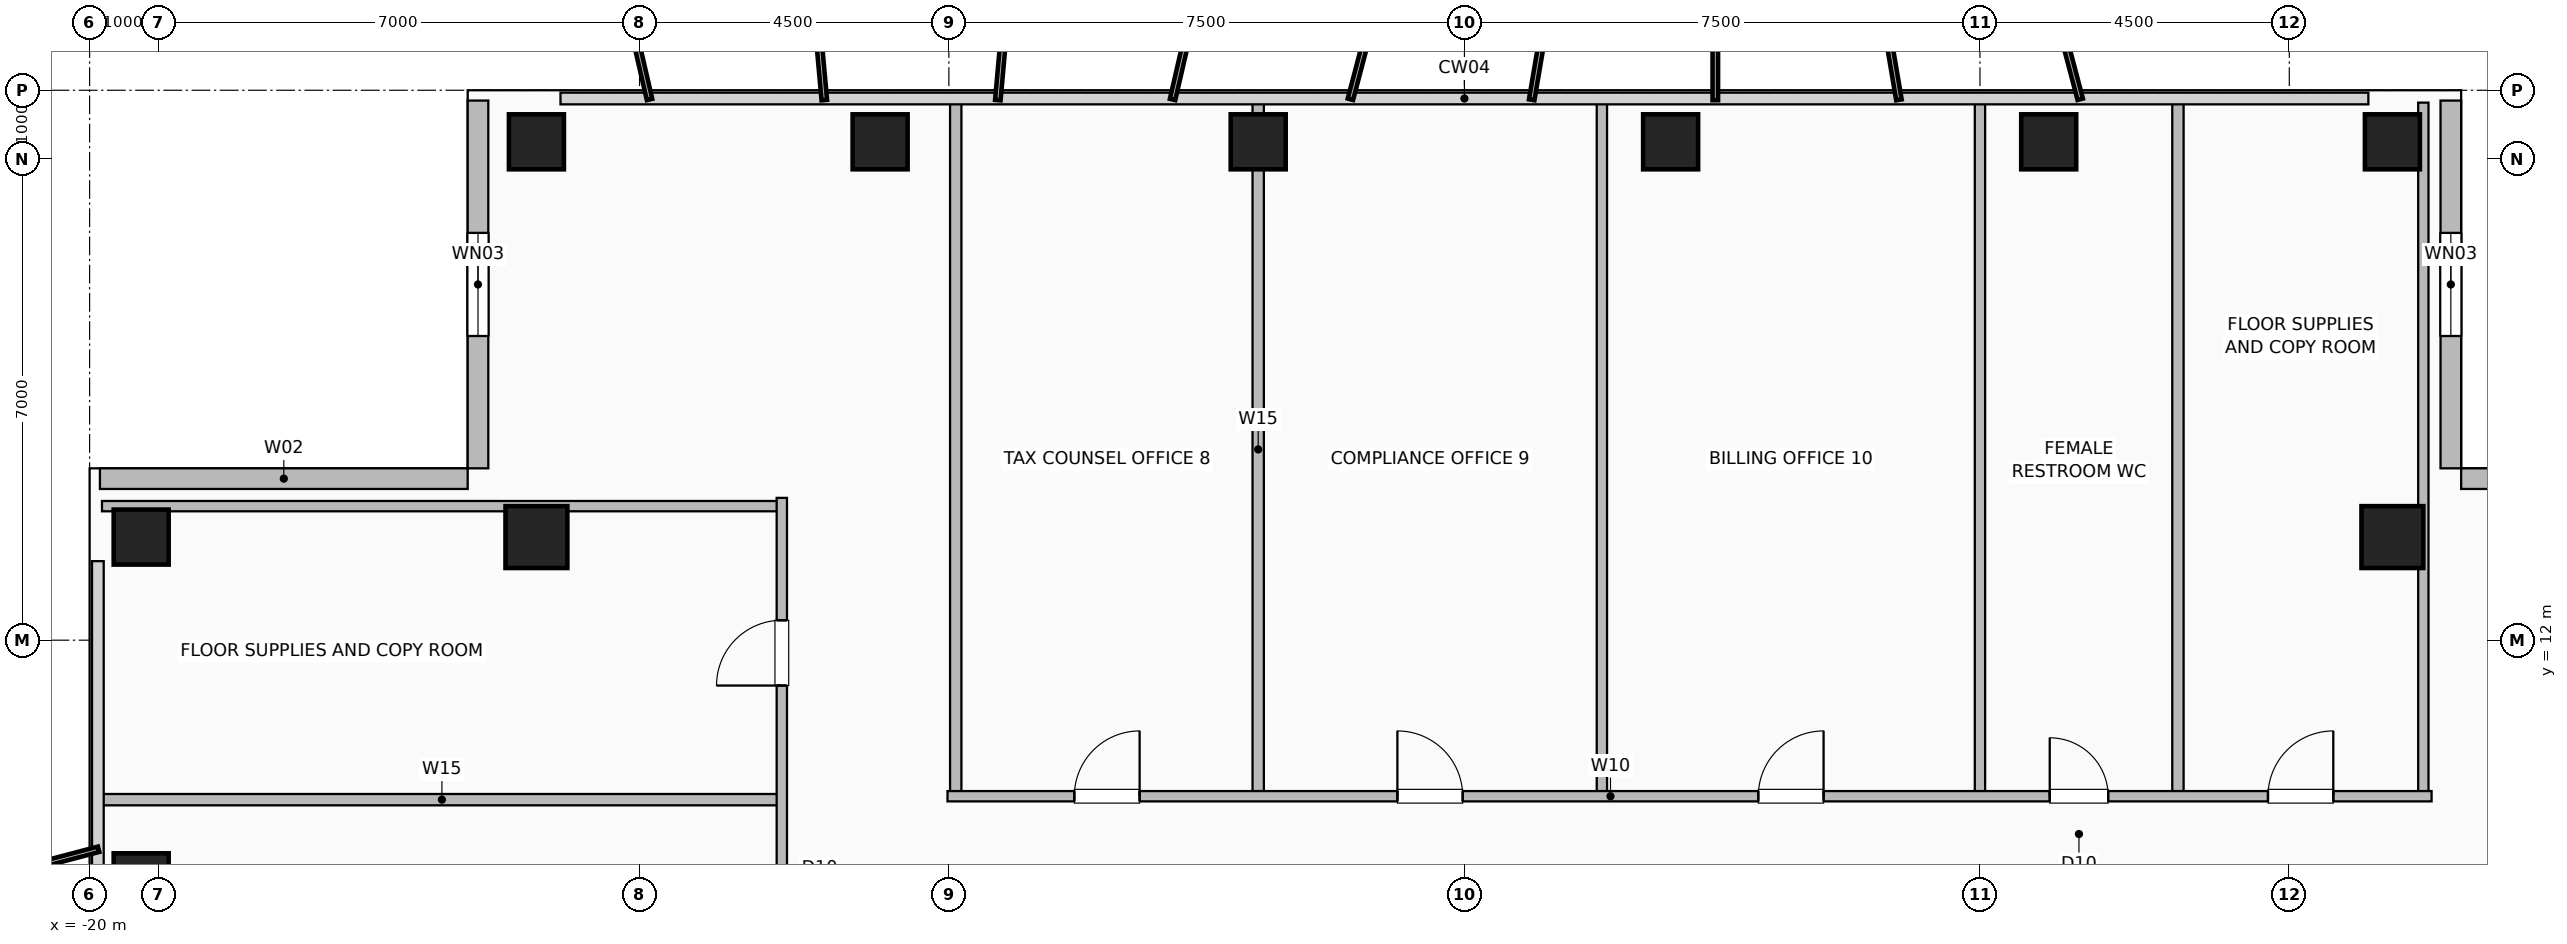
"""IFC4 building model, lengths in metres.
Left out: names, types, materials, properties, quantities, classifications, styles, units other than length and angle.
Written with IfcOpenShell. Run it as: python <this file> out.ifc"""

import sys

from ifc_helpers import new_model, si_unit, direction, frame, frame_2d, origin, origin_2d, place, context, subcontext, project, spatial, rectangle, hollow_rectangle, extrude, element, fill, save


model = new_model("IFC4")
c1 = context("Model", 3, precision=1e-05, world=origin(), true_north=direction((0.0, 1.0)))
c2 = subcontext(c1, "Body", "Model", "MODEL_VIEW")
j1 = project(units=[si_unit("LENGTHUNIT", "METRE"), si_unit("PLANEANGLEUNIT", "RADIAN")], contexts=[c1])
p1 = place(None, origin())
s1 = spatial("IfcSite", under=j1, at=p1, CompositionType="ELEMENT")
p2 = place(p1, origin())
s2 = spatial("IfcBuilding", under=s1, at=p2, CompositionType="ELEMENT")
p3 = place(p2, frame((0.0, 0.0, 173.4)))
s3 = spatial("IfcBuildingStorey", under=s2, at=p3, CompositionType="ELEMENT", Elevation=173.4)
for number, where, z_axis, x_axis in (
    (1, (-13.5, 19.25, 0.0), (0.0, 0.0, 1.0), (1.0, 0.0, 0.0)),
    (2, (-8.5, 19.25, 0.0), (0.0, 0.0, 1.0), (1.0, 0.0, 0.0)),
    (3, (-3.0, 19.25, 0.0), (0.0, 0.0, 1.0), (1.0, 0.0, 0.0)),
    (4, (3.0, 19.25, 0.0), (0.0, 0.0, 1.0), (1.0, 0.0, 0.0)),
    (5, (8.5, 19.25, 0.0), (0.0, 0.0, 1.0), (1.0, 0.0, 0.0)),
    (6, (-19.25, 8.5, 0.0), (0.0, 0.0, 1.0), (1.0, 0.0, 0.0)),
    (7, (13.5, 19.25, 0.0), (0.0, 0.0, 1.0), (1.0, 0.0, 0.0)),
    (8, (-19.25, 13.5, 0.0), (0.0, 0.0, 1.0), (1.0, 0.0, 0.0)),
):
    element("IfcColumn", number, at=place(p3, frame(where, z_axis=z_axis, x_axis=x_axis)), inside=s3, PredefinedType="COLUMN", context=c2, shape_type="SweptSolid", body=[
        extrude(hollow_rectangle(XDim=0.8, YDim=0.8, WallThickness=0.04, at=origin_2d()), origin(), (0.0, 0.0, 1.0), 3.6),
    ])
for number, where, z_axis, x_axis in (
    (9, (13.5, 13.5, 0.0), (0.0, 0.0, 1.0), (1.0, 0.0, 0.0)),
    (10, (-13.5, 13.5, 0.0), (0.0, 0.0, 1.0), (1.0, 0.0, 0.0)),
):
    element("IfcColumn", number, at=place(p3, frame(where, z_axis=z_axis, x_axis=x_axis)), inside=s3, PredefinedType="COLUMN", context=c2, shape_type="SweptSolid", body=[
        extrude(hollow_rectangle(XDim=0.9, YDim=0.9, WallThickness=0.045, at=origin_2d()), origin(), (0.0, 0.0, 1.0), 3.6),
    ])
p4 = place(p3, frame((14.35, 19.85, 0.0), z_axis=(0.0, 0.0, 1.0), x_axis=(0.0, -1.0, 0.0)))
e11 = element("IfcWall", 11, at=p4, inside=s3, PredefinedType="SOLIDWALL", context=c2, shape_type="SweptSolid", body=[
    extrude(rectangle(XDim=5.35, YDim=0.3, at=frame_2d((2.675, 0.0))), origin(), (0.0, 0.0, 1.0), 3.36),
])
p5 = place(p4, frame((1.925, 0.0, 0.9)))
e12 = element("IfcOpeningElement", 12, at=p5, cuts=e11, PredefinedType="OPENING", context=c2, shape_type="SweptSolid", body=[
    extrude(rectangle(XDim=1.5, YDim=1.8, at=frame_2d((0.75, 0.9))), frame((0.0, 0.16, 0.0), z_axis=(0.0, -1.0, 0.0), x_axis=(1.0, 0.0, 0.0)), (0.0, 0.0, 1.0), 0.32),
])
p6 = place(p3, frame((19.85, 14.35, 0.0), z_axis=(0.0, 0.0, 1.0), x_axis=(-1.0, 0.0, 0.0)))
e13 = element("IfcWall", 13, at=p6, inside=s3, PredefinedType="SOLIDWALL", context=c2, shape_type="SweptSolid", body=[
    extrude(rectangle(XDim=5.35, YDim=0.3, at=frame_2d((2.675, 0.0))), origin(), (0.0, 0.0, 1.0), 3.36),
])
p7 = place(p3, frame((-14.35, 19.85, 0.0), z_axis=(0.0, 0.0, 1.0), x_axis=(0.0, -1.0, 0.0)))
e14 = element("IfcWall", 14, at=p7, inside=s3, PredefinedType="SOLIDWALL", context=c2, shape_type="SweptSolid", body=[
    extrude(rectangle(XDim=5.35, YDim=0.3, at=frame_2d((2.675, 0.0))), origin(), (0.0, 0.0, 1.0), 3.36),
])
p8 = place(p7, frame((1.925, 0.0, 0.9)))
e15 = element("IfcOpeningElement", 15, at=p8, cuts=e14, PredefinedType="OPENING", context=c2, shape_type="SweptSolid", body=[
    extrude(rectangle(XDim=1.5, YDim=1.8, at=frame_2d((0.75, 0.9))), frame((0.0, 0.16, 0.0), z_axis=(0.0, -1.0, 0.0), x_axis=(1.0, 0.0, 0.0)), (0.0, 0.0, 1.0), 0.32),
])
p9 = place(p3, frame((-19.85, 14.35, 0.0), z_axis=(0.0, 0.0, 1.0), x_axis=(1.0, 0.0, 0.0)))
e16 = element("IfcWall", 16, at=p9, inside=s3, PredefinedType="SOLIDWALL", context=c2, shape_type="SweptSolid", body=[
    extrude(rectangle(XDim=5.35, YDim=0.3, at=frame_2d((2.675, 0.0))), origin(), (0.0, 0.0, 1.0), 3.36),
])
p10 = place(p3, frame((-19.82, 9.68, 0.0), z_axis=(0.0, 0.0, 1.0), x_axis=(1.0, 0.0, 0.0)))
e17 = element("IfcWall", 17, at=p10, inside=s3, PredefinedType="PLUMBINGWALL", context=c2, shape_type="SweptSolid", body=[
    extrude(rectangle(XDim=9.89, YDim=0.165, at=frame_2d((4.945, 0.0))), origin(), (0.0, 0.0, 1.0), 3.36),
])
p11 = place(p3, frame((-19.82, 13.95, 0.0), z_axis=(0.0, 0.0, 1.0), x_axis=(1.0, 0.0, 0.0)))
e18 = element("IfcWall", 18, at=p11, inside=s3, PredefinedType="PARTITIONING", context=c2, shape_type="SweptSolid", body=[
    extrude(rectangle(XDim=9.89, YDim=0.15, at=frame_2d((4.945, 0.0))), origin(), (0.0, 0.0, 1.0), 3.36),
])
p12 = place(p3, frame((-9.93, -7.52, 0.0), z_axis=(0.0, 0.0, 1.0), x_axis=(0.0, 1.0, 0.0)))
e19 = element("IfcWall", 19, at=p12, inside=s3, PredefinedType="PARTITIONING", context=c2, shape_type="SweptSolid", body=[
    extrude(rectangle(XDim=21.59, YDim=0.15, at=frame_2d((10.795, 0.0))), origin(), (0.0, 0.0, 1.0), 3.36),
])
p13 = place(p12, frame((1.745, 0.0, 0.0)))
e20 = element("IfcOpeningElement", 20, at=p13, cuts=e19, PredefinedType="OPENING", context=c2, shape_type="SweptSolid", body=[
    extrude(rectangle(XDim=0.95, YDim=2.06, at=frame_2d((0.475, 1.03))), frame((0.0, 0.085, 0.0), z_axis=(0.0, -1.0, 0.0), x_axis=(1.0, 0.0, 0.0)), (0.0, 0.0, 1.0), 0.17),
])
p14 = place(p12, frame((6.195, 0.0, 0.0)))
e21 = element("IfcOpeningElement", 21, at=p14, cuts=e19, PredefinedType="OPENING", context=c2, shape_type="SweptSolid", body=[
    extrude(rectangle(XDim=0.95, YDim=2.06, at=frame_2d((0.475, 1.03))), frame((0.0, 0.085, 0.0), z_axis=(0.0, -1.0, 0.0), x_axis=(1.0, 0.0, 0.0)), (0.0, 0.0, 1.0), 0.17),
])
p15 = place(p12, frame((11.195, 0.0, 0.0)))
e22 = element("IfcOpeningElement", 22, at=p15, cuts=e19, PredefinedType="OPENING", context=c2, shape_type="SweptSolid", body=[
    extrude(rectangle(XDim=0.95, YDim=2.06, at=frame_2d((0.475, 1.03))), frame((0.0, 0.085, 0.0), z_axis=(0.0, -1.0, 0.0), x_axis=(1.0, 0.0, 0.0)), (0.0, 0.0, 1.0), 0.17),
])
p16 = place(p12, frame((15.335, 0.0, 0.0)))
e23 = element("IfcOpeningElement", 23, at=p16, cuts=e19, PredefinedType="OPENING", context=c2, shape_type="SweptSolid", body=[
    extrude(rectangle(XDim=0.85, YDim=2.05, at=frame_2d((0.425, 1.025))), frame((0.0, 0.085, 0.0), z_axis=(0.0, -1.0, 0.0), x_axis=(1.0, 0.0, 0.0)), (0.0, 0.0, 1.0), 0.17),
])
p17 = place(p12, frame((18.86, 0.0, 0.0)))
e24 = element("IfcOpeningElement", 24, at=p17, cuts=e19, PredefinedType="OPENING", context=c2, shape_type="SweptSolid", body=[
    extrude(rectangle(XDim=0.95, YDim=2.06, at=frame_2d((0.475, 1.03))), frame((0.0, 0.085, 0.0), z_axis=(0.0, -1.0, 0.0), x_axis=(1.0, 0.0, 0.0)), (0.0, 0.0, 1.0), 0.17),
])
for number, where, z_axis, x_axis in (
    (25, (10.38, 9.73, 0.0), (0.0, 0.0, 1.0), (0.0, 1.0, 0.0)),
    (26, (-7.4, 9.73, 0.0), (0.0, 0.0, 1.0), (0.0, 1.0, 0.0)),
):
    element("IfcWall", number, at=place(p3, frame(where, z_axis=z_axis, x_axis=x_axis)), inside=s3, PredefinedType="PLUMBINGWALL", context=c2, shape_type="SweptSolid", body=[
        extrude(rectangle(XDim=10.09, YDim=0.165, at=frame_2d((5.045, 0.0))), origin(), (0.0, 0.0, 1.0), 3.36),
    ])
p18 = place(p3, frame((-3.0, 9.73, 0.0), z_axis=(0.0, 0.0, 1.0), x_axis=(0.0, 1.0, 0.0)))
e27 = element("IfcWall", 27, at=p18, inside=s3, PredefinedType="PLUMBINGWALL", context=c2, shape_type="SweptSolid", body=[
    extrude(rectangle(XDim=10.09, YDim=0.165, at=frame_2d((5.045, 0.0))), origin(), (0.0, 0.0, 1.0), 2.792),
])
for number, where, z_axis, x_axis in (
    (28, (2.0, 9.73, 0.0), (0.0, 0.0, 1.0), (0.0, 1.0, 0.0)),
    (29, (7.5, 9.73, 0.0), (0.0, 0.0, 1.0), (0.0, 1.0, 0.0)),
    (30, (13.95, 9.73, 0.0), (0.0, 0.0, 1.0), (0.0, 1.0, 0.0)),
):
    element("IfcWall", number, at=place(p3, frame(where, z_axis=z_axis, x_axis=x_axis)), inside=s3, PredefinedType="PARTITIONING", context=c2, shape_type="SweptSolid", body=[
        extrude(rectangle(XDim=10.09, YDim=0.15, at=frame_2d((5.045, 0.0))), origin(), (0.0, 0.0, 1.0), 3.36),
    ])
p19 = place(p3, frame((-7.52, 9.73, 0.0), z_axis=(0.0, 0.0, 1.0), x_axis=(1.0, 0.0, 0.0)))
e31 = element("IfcWall", 31, at=p19, inside=s3, PredefinedType="PARTITIONING", context=c2, shape_type="SweptSolid", body=[
    extrude(rectangle(XDim=21.59, YDim=0.15, at=frame_2d((10.795, 0.0))), origin(), (0.0, 0.0, 1.0), 3.36),
])
p20 = place(p19, frame((1.845, 0.0, 0.0)))
e32 = element("IfcOpeningElement", 32, at=p20, cuts=e31, PredefinedType="OPENING", context=c2, shape_type="SweptSolid", body=[
    extrude(rectangle(XDim=0.95, YDim=2.06, at=frame_2d((0.475, 1.03))), frame((0.0, 0.085, 0.0), z_axis=(0.0, -1.0, 0.0), x_axis=(1.0, 0.0, 0.0)), (0.0, 0.0, 1.0), 0.17),
])
p21 = place(p19, frame((6.545, 0.0, 0.0)))
e33 = element("IfcOpeningElement", 33, at=p21, cuts=e31, PredefinedType="OPENING", context=c2, shape_type="SweptSolid", body=[
    extrude(rectangle(XDim=0.95, YDim=2.06, at=frame_2d((0.475, 1.03))), frame((0.0, 0.085, 0.0), z_axis=(0.0, -1.0, 0.0), x_axis=(1.0, 0.0, 0.0)), (0.0, 0.0, 1.0), 0.17),
])
p22 = place(p19, frame((11.795, 0.0, 0.0)))
e34 = element("IfcOpeningElement", 34, at=p22, cuts=e31, PredefinedType="OPENING", context=c2, shape_type="SweptSolid", body=[
    extrude(rectangle(XDim=0.95, YDim=2.06, at=frame_2d((0.475, 1.03))), frame((0.0, 0.085, 0.0), z_axis=(0.0, -1.0, 0.0), x_axis=(1.0, 0.0, 0.0)), (0.0, 0.0, 1.0), 0.17),
])
p23 = place(p19, frame((16.035, 0.0, 0.0)))
e35 = element("IfcOpeningElement", 35, at=p23, cuts=e31, PredefinedType="OPENING", context=c2, shape_type="SweptSolid", body=[
    extrude(rectangle(XDim=0.85, YDim=2.05, at=frame_2d((0.425, 1.025))), frame((0.0, 0.085, 0.0), z_axis=(0.0, -1.0, 0.0), x_axis=(1.0, 0.0, 0.0)), (0.0, 0.0, 1.0), 0.17),
])
p24 = place(p19, frame((19.21, 0.0, 0.0)))
e36 = element("IfcOpeningElement", 36, at=p24, cuts=e31, PredefinedType="OPENING", context=c2, shape_type="SweptSolid", body=[
    extrude(rectangle(XDim=0.95, YDim=2.06, at=frame_2d((0.475, 1.03))), frame((0.0, 0.085, 0.0), z_axis=(0.0, -1.0, 0.0), x_axis=(1.0, 0.0, 0.0)), (0.0, 0.0, 1.0), 0.17),
])
p25 = place(p5, origin())
e37 = element("IfcWindow", 37, at=p25, inside=s3, PartitioningType="SINGLE_PANEL", PredefinedType="WINDOW", context=c2, shape_type="SweptSolid", body=[
    extrude(rectangle(XDim=1.5, YDim=1.8, at=frame_2d((0.75, 0.9))), frame((0.0, 0.03, 0.0), z_axis=(0.0, -1.0, 0.0), x_axis=(1.0, 0.0, 0.0)), (0.0, 0.0, 1.0), 0.06),
])
fill(e12, e37)
p26 = place(p8, origin())
e38 = element("IfcWindow", 38, at=p26, inside=s3, PartitioningType="SINGLE_PANEL", PredefinedType="WINDOW", context=c2, shape_type="SweptSolid", body=[
    extrude(rectangle(XDim=1.5, YDim=1.8, at=frame_2d((0.75, 0.9))), frame((0.0, 0.03, 0.0), z_axis=(0.0, -1.0, 0.0), x_axis=(1.0, 0.0, 0.0)), (0.0, 0.0, 1.0), 0.06),
])
fill(e15, e38)
p27 = place(p17, origin())
e39 = element("IfcDoor", 39, at=p27, inside=s3, OperationType="SINGLE_SWING_LEFT", PredefinedType="DOOR", context=c2, shape_type="SweptSolid", body=[
    extrude(rectangle(XDim=0.95, YDim=2.06, at=frame_2d((0.475, 1.03))), frame((0.0, 0.025, 0.0), z_axis=(0.0, -1.0, 0.0), x_axis=(1.0, 0.0, 0.0)), (0.0, 0.0, 1.0), 0.05),
])
fill(e24, e39)
p28 = place(p20, origin())
e40 = element("IfcDoor", 40, at=p28, inside=s3, OperationType="SINGLE_SWING_RIGHT", PredefinedType="DOOR", context=c2, shape_type="SweptSolid", body=[
    extrude(rectangle(XDim=0.95, YDim=2.06, at=frame_2d((0.475, 1.03))), frame((0.0, 0.025, 0.0), z_axis=(0.0, -1.0, 0.0), x_axis=(1.0, 0.0, 0.0)), (0.0, 0.0, 1.0), 0.05),
])
fill(e32, e40)
p29 = place(p21, origin())
e41 = element("IfcDoor", 41, at=p29, inside=s3, OperationType="SINGLE_SWING_LEFT", PredefinedType="DOOR", context=c2, shape_type="SweptSolid", body=[
    extrude(rectangle(XDim=0.95, YDim=2.06, at=frame_2d((0.475, 1.03))), frame((0.0, 0.025, 0.0), z_axis=(0.0, -1.0, 0.0), x_axis=(1.0, 0.0, 0.0)), (0.0, 0.0, 1.0), 0.05),
])
fill(e33, e41)
p30 = place(p22, origin())
e42 = element("IfcDoor", 42, at=p30, inside=s3, OperationType="SINGLE_SWING_RIGHT", PredefinedType="DOOR", context=c2, shape_type="SweptSolid", body=[
    extrude(rectangle(XDim=0.95, YDim=2.06, at=frame_2d((0.475, 1.03))), frame((0.0, 0.025, 0.0), z_axis=(0.0, -1.0, 0.0), x_axis=(1.0, 0.0, 0.0)), (0.0, 0.0, 1.0), 0.05),
])
fill(e34, e42)
p31 = place(p23, origin())
e43 = element("IfcDoor", 43, at=p31, inside=s3, OperationType="SINGLE_SWING_LEFT", PredefinedType="DOOR", context=c2, shape_type="SweptSolid", body=[
    extrude(rectangle(XDim=0.85, YDim=2.05, at=frame_2d((0.425, 1.025))), frame((0.0, 0.025, 0.0), z_axis=(0.0, -1.0, 0.0), x_axis=(1.0, 0.0, 0.0)), (0.0, 0.0, 1.0), 0.05),
])
fill(e35, e43)
p32 = place(p24, origin())
e44 = element("IfcDoor", 44, at=p32, inside=s3, OperationType="SINGLE_SWING_RIGHT", PredefinedType="DOOR", context=c2, shape_type="SweptSolid", body=[
    extrude(rectangle(XDim=0.95, YDim=2.06, at=frame_2d((0.475, 1.03))), frame((0.0, 0.025, 0.0), z_axis=(0.0, -1.0, 0.0), x_axis=(1.0, 0.0, 0.0)), (0.0, 0.0, 1.0), 0.05),
])
fill(e36, e44)
save(model, sys.argv[1])
